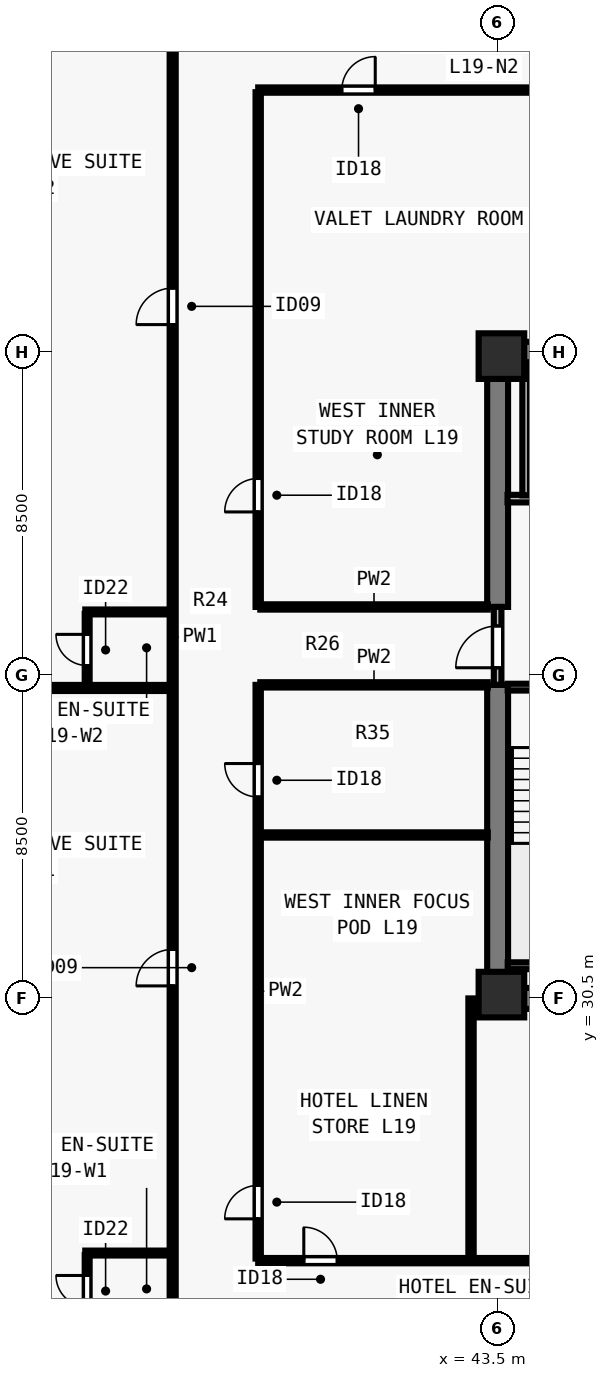
"""IFC4 building model, lengths in metres.
Left out: names, types, materials, properties, quantities, classifications, styles, units other than length and angle.
Written with IfcOpenShell. Run it as: python <this file> out.ifc"""

import sys

from ifc_helpers import new_model, si_unit, direction, frame, frame_2d, origin, origin_2d, place, context, subcontext, project, spatial, rectangle, extrude, element, fill, save


model = new_model("IFC4")
c1 = context("Model", 3, precision=1e-05, world=origin(), true_north=direction((0.0, 1.0)))
c2 = subcontext(c1, "Body", "Model", "MODEL_VIEW")
j1 = project(units=[si_unit("LENGTHUNIT", "METRE"), si_unit("PLANEANGLEUNIT", "RADIAN")], contexts=[c1])
p1 = place(None, origin())
s1 = spatial("IfcSite", under=j1, at=p1, CompositionType="ELEMENT")
p2 = place(p1, origin())
s2 = spatial("IfcBuilding", under=s1, at=p2, CompositionType="ELEMENT")
p3 = place(p2, frame((0.0, 0.0, 72.5)))
s3 = spatial("IfcBuildingStorey", under=s2, at=p3, CompositionType="ELEMENT", Elevation=72.5)
for number, where, z_axis, x_axis in (
    (1, (43.6, 30.6, 0.0), (0.0, 0.0, 1.0), (1.0, 0.0, 0.0)),
    (2, (43.6, 47.4, 0.0), (0.0, 0.0, 1.0), (1.0, 0.0, 0.0)),
):
    element("IfcColumn", number, at=place(p3, frame(where, z_axis=z_axis, x_axis=x_axis)), inside=s3, PredefinedType="COLUMN", context=c2, shape_type="SweptSolid", body=[
        extrude(rectangle(XDim=1.2, YDim=1.2, at=origin_2d()), origin(), (0.0, 0.0, 1.0), 3.5),
    ])
for number, where, z_axis, x_axis in (
    (3, (43.225, 30.5, 0.0), (0.0, 0.0, 1.0), (1.0, 0.0, 0.0)),
    (4, (43.225, 47.5, 0.0), (0.0, 0.0, 1.0), (1.0, 0.0, 0.0)),
):
    element("IfcWall", number, at=place(p3, frame(where, z_axis=z_axis, x_axis=x_axis)), inside=s3, PredefinedType="SHEAR", context=c2, shape_type="SweptSolid", body=[
        extrude(rectangle(XDim=17.55, YDim=0.55, at=frame_2d((8.775, 0.0))), origin(), (0.0, 0.0, 1.0), 3.28),
    ])
p4 = place(p3, frame((43.5, 30.765, 0.0), z_axis=(0.0, 0.0, 1.0), x_axis=(0.0, 1.0, 0.0)))
e5 = element("IfcWall", 5, at=p4, inside=s3, PredefinedType="SHEAR", context=c2, shape_type="SweptSolid", body=[
    extrude(rectangle(XDim=7.985, YDim=0.55, at=frame_2d((3.993, 0.0))), origin(), (0.0, 0.0, 1.0), 3.28),
])
p5 = place(p3, frame((43.5, 40.8, 0.0), z_axis=(0.0, 0.0, 1.0), x_axis=(0.0, 1.0, 0.0)))
e6 = element("IfcWall", 6, at=p5, inside=s3, PredefinedType="SHEAR", context=c2, shape_type="SweptSolid", body=[
    extrude(rectangle(XDim=6.435, YDim=0.55, at=frame_2d((3.218, 0.0))), origin(), (0.0, 0.0, 1.0), 3.28),
])
p6 = place(p3, frame((43.5, 38.75, 0.0), z_axis=(0.0, 0.0, 1.0), x_axis=(0.0, 1.0, 0.0)))
e7 = element("IfcWall", 7, at=p6, inside=s3, PredefinedType="SOLIDWALL", context=c2, shape_type="SweptSolid", body=[
    extrude(rectangle(XDim=2.05, YDim=0.2, at=frame_2d((1.025, 0.0))), origin(), (0.0, 0.0, 1.0), 3.28),
])
p7 = place(p6, frame((0.45, 0.0, 0.0)))
e8 = element("IfcOpeningElement", 8, at=p7, cuts=e7, PredefinedType="OPENING", context=c2, shape_type="SweptSolid", body=[
    extrude(rectangle(XDim=1.1, YDim=2.15, at=frame_2d((0.55, 1.075))), frame((0.0, 0.11, 0.0), z_axis=(0.0, -1.0, 0.0), x_axis=(1.0, 0.0, 0.0)), (0.0, 0.0, 1.0), 0.22),
])
p8 = place(p3, frame((43.76, 43.65, 0.0), z_axis=(0.0, 0.0, 1.0), x_axis=(1.0, 0.0, 0.0)))
e9 = element("IfcWall", 9, at=p8, inside=s3, PredefinedType="SOLIDWALL", context=c2, shape_type="SweptSolid", body=[
    extrude(rectangle(XDim=3.505, YDim=0.2, at=frame_2d((1.752, 0.0))), origin(), (0.0, 0.0, 1.0), 3.28),
])
p9 = place(p8, frame((1.11, 0.0, 0.0)))
e10 = element("IfcOpeningElement", 10, at=p9, cuts=e9, PredefinedType="OPENING", context=c2, shape_type="SweptSolid", body=[
    extrude(rectangle(XDim=1.1, YDim=2.2, at=frame_2d((0.55, 1.1))), frame((0.0, 0.11, 0.0), z_axis=(0.0, -1.0, 0.0), x_axis=(1.0, 0.0, 0.0)), (0.0, 0.0, 1.0), 0.22),
])
p10 = place(p3, frame((44.25, 43.735, 0.0), z_axis=(0.0, 0.0, 1.0), x_axis=(0.0, 1.0, 0.0)))
e11 = element("IfcWall", 11, at=p10, inside=s3, PredefinedType="SOLIDWALL", context=c2, shape_type="SweptSolid", body=[
    extrude(rectangle(XDim=3.505, YDim=0.2, at=frame_2d((1.752, 0.0))), origin(), (0.0, 0.0, 1.0), 3.28),
])
p11 = place(p3, frame((34.95, 21.415, 0.0), z_axis=(0.0, 0.0, 1.0), x_axis=(0.0, 1.0, 0.0)))
e12 = element("IfcWall", 12, at=p11, inside=s3, PredefinedType="PARTITIONING", context=c2, shape_type="SweptSolid", body=[
    extrude(rectangle(XDim=35.17, YDim=0.16, at=frame_2d((17.585, 0.0))), origin(), (0.0, 0.0, 1.0), 3.28),
])
p12 = place(p11, frame((9.414, 0.0, 0.0)))
e13 = element("IfcOpeningElement", 13, at=p12, cuts=e12, PredefinedType="OPENING", context=c2, shape_type="SweptSolid", body=[
    extrude(rectangle(XDim=0.96, YDim=2.15, at=frame_2d((0.48, 1.075))), frame((0.0, 0.09, 0.0), z_axis=(0.0, -1.0, 0.0), x_axis=(1.0, 0.0, 0.0)), (0.0, 0.0, 1.0), 0.18),
])
p13 = place(p11, frame((26.814, 0.0, 0.0)))
e14 = element("IfcOpeningElement", 14, at=p13, cuts=e12, PredefinedType="OPENING", context=c2, shape_type="SweptSolid", body=[
    extrude(rectangle(XDim=0.96, YDim=2.15, at=frame_2d((0.48, 1.075))), frame((0.0, 0.09, 0.0), z_axis=(0.0, -1.0, 0.0), x_axis=(1.0, 0.0, 0.0)), (0.0, 0.0, 1.0), 0.18),
])
p14 = place(p3, frame((37.2, 23.6, 0.0), z_axis=(0.0, 0.0, 1.0), x_axis=(1.0, 0.0, 0.0)))
e15 = element("IfcWall", 15, at=p14, inside=s3, PredefinedType="PARTITIONING", context=c2, shape_type="SweptSolid", body=[
    extrude(rectangle(XDim=29.6, YDim=0.14, at=frame_2d((14.8, 0.0))), origin(), (0.0, 0.0, 1.0), 3.28),
])
p15 = place(p14, frame((1.2, 0.0, 0.0)))
e16 = element("IfcOpeningElement", 16, at=p15, cuts=e15, PredefinedType="OPENING", context=c2, shape_type="SweptSolid", body=[
    extrude(rectangle(XDim=0.88, YDim=2.1, at=frame_2d((0.44, 1.05))), frame((0.0, 0.08, 0.0), z_axis=(0.0, -1.0, 0.0), x_axis=(1.0, 0.0, 0.0)), (0.0, 0.0, 1.0), 0.16),
])
p16 = place(p14, frame((11.3, 0.0, 0.0)))
e17 = element("IfcOpeningElement", 17, at=p16, cuts=e15, PredefinedType="OPENING", context=c2, shape_type="SweptSolid", body=[
    extrude(rectangle(XDim=0.88, YDim=2.1, at=frame_2d((0.44, 1.05))), frame((0.0, 0.08, 0.0), z_axis=(0.0, -1.0, 0.0), x_axis=(1.0, 0.0, 0.0)), (0.0, 0.0, 1.0), 0.16),
])
p17 = place(p14, frame((21.8, 0.0, 0.0)))
e18 = element("IfcOpeningElement", 18, at=p17, cuts=e15, PredefinedType="OPENING", context=c2, shape_type="SweptSolid", body=[
    extrude(rectangle(XDim=0.88, YDim=2.1, at=frame_2d((0.44, 1.05))), frame((0.0, 0.08, 0.0), z_axis=(0.0, -1.0, 0.0), x_axis=(1.0, 0.0, 0.0)), (0.0, 0.0, 1.0), 0.16),
])
p18 = place(p3, frame((37.2, 54.4, 0.0), z_axis=(0.0, 0.0, 1.0), x_axis=(1.0, 0.0, 0.0)))
e19 = element("IfcWall", 19, at=p18, inside=s3, PredefinedType="PARTITIONING", context=c2, shape_type="SweptSolid", body=[
    extrude(rectangle(XDim=29.6, YDim=0.14, at=frame_2d((14.8, 0.0))), origin(), (0.0, 0.0, 1.0), 3.28),
])
p19 = place(p18, frame((2.2, 0.0, 0.0)))
e20 = element("IfcOpeningElement", 20, at=p19, cuts=e19, PredefinedType="OPENING", context=c2, shape_type="SweptSolid", body=[
    extrude(rectangle(XDim=0.88, YDim=2.1, at=frame_2d((0.44, 1.05))), frame((0.0, 0.08, 0.0), z_axis=(0.0, -1.0, 0.0), x_axis=(1.0, 0.0, 0.0)), (0.0, 0.0, 1.0), 0.16),
])
p20 = place(p18, frame((15.3, 0.0, 0.0)))
e21 = element("IfcOpeningElement", 21, at=p20, cuts=e19, PredefinedType="OPENING", context=c2, shape_type="SweptSolid", body=[
    extrude(rectangle(XDim=0.88, YDim=2.1, at=frame_2d((0.44, 1.05))), frame((0.0, 0.08, 0.0), z_axis=(0.0, -1.0, 0.0), x_axis=(1.0, 0.0, 0.0)), (0.0, 0.0, 1.0), 0.16),
])
p21 = place(p18, frame((24.8, 0.0, 0.0)))
e22 = element("IfcOpeningElement", 22, at=p21, cuts=e19, PredefinedType="OPENING", context=c2, shape_type="SweptSolid", body=[
    extrude(rectangle(XDim=0.88, YDim=2.1, at=frame_2d((0.44, 1.05))), frame((0.0, 0.08, 0.0), z_axis=(0.0, -1.0, 0.0), x_axis=(1.0, 0.0, 0.0)), (0.0, 0.0, 1.0), 0.16),
])
p22 = place(p3, frame((37.2, 23.655, 0.0), z_axis=(0.0, 0.0, 1.0), x_axis=(0.0, 1.0, 0.0)))
e23 = element("IfcWall", 23, at=p22, inside=s3, PredefinedType="PARTITIONING", context=c2, shape_type="SweptSolid", body=[
    extrude(rectangle(XDim=15.095, YDim=0.14, at=frame_2d((7.547, 0.0))), origin(), (0.0, 0.0, 1.0), 3.28),
])
p23 = place(p22, frame((1.045, 0.0, 0.0)))
e24 = element("IfcOpeningElement", 24, at=p23, cuts=e23, PredefinedType="OPENING", context=c2, shape_type="SweptSolid", body=[
    extrude(rectangle(XDim=0.88, YDim=2.1, at=frame_2d((0.44, 1.05))), frame((0.0, 0.08, 0.0), z_axis=(0.0, -1.0, 0.0), x_axis=(1.0, 0.0, 0.0)), (0.0, 0.0, 1.0), 0.16),
])
p24 = place(p22, frame((12.145, 0.0, 0.0)))
e25 = element("IfcOpeningElement", 25, at=p24, cuts=e23, PredefinedType="OPENING", context=c2, shape_type="SweptSolid", body=[
    extrude(rectangle(XDim=0.88, YDim=2.1, at=frame_2d((0.44, 1.05))), frame((0.0, 0.08, 0.0), z_axis=(0.0, -1.0, 0.0), x_axis=(1.0, 0.0, 0.0)), (0.0, 0.0, 1.0), 0.16),
])
p25 = place(p3, frame((37.2, 40.8, 0.0), z_axis=(0.0, 0.0, 1.0), x_axis=(0.0, 1.0, 0.0)))
e26 = element("IfcWall", 26, at=p25, inside=s3, PredefinedType="PARTITIONING", context=c2, shape_type="SweptSolid", body=[
    extrude(rectangle(XDim=13.545, YDim=0.14, at=frame_2d((6.772, 0.0))), origin(), (0.0, 0.0, 1.0), 3.28),
])
p26 = place(p25, frame((2.5, 0.0, 0.0)))
e27 = element("IfcOpeningElement", 27, at=p26, cuts=e26, PredefinedType="OPENING", context=c2, shape_type="SweptSolid", body=[
    extrude(rectangle(XDim=0.88, YDim=2.1, at=frame_2d((0.44, 1.05))), frame((0.0, 0.08, 0.0), z_axis=(0.0, -1.0, 0.0), x_axis=(1.0, 0.0, 0.0)), (0.0, 0.0, 1.0), 0.16),
])
for number, where, z_axis, x_axis in (
    (28, (37.255, 38.75, 0.0), (0.0, 0.0, 1.0), (1.0, 0.0, 0.0)),
    (29, (37.255, 40.8, 0.0), (0.0, 0.0, 1.0), (1.0, 0.0, 0.0)),
):
    element("IfcWall", number, at=place(p3, frame(where, z_axis=z_axis, x_axis=x_axis)), inside=s3, PredefinedType="PARTITIONING", context=c2, shape_type="SweptSolid", body=[
        extrude(rectangle(XDim=5.985, YDim=0.14, at=frame_2d((2.993, 0.0))), origin(), (0.0, 0.0, 1.0), 3.28),
    ])
p27 = place(p3, frame((42.8, 23.655, 0.0), z_axis=(0.0, 0.0, 1.0), x_axis=(0.0, 1.0, 0.0)))
e30 = element("IfcWall", 30, at=p27, inside=s3, PredefinedType="PARTITIONING", context=c2, shape_type="SweptSolid", body=[
    extrude(rectangle(XDim=6.845, YDim=0.14, at=frame_2d((3.422, 0.0))), origin(), (0.0, 0.0, 1.0), 2.439),
])
p28 = place(p3, frame((37.255, 34.8, 0.0), z_axis=(0.0, 0.0, 1.0), x_axis=(1.0, 0.0, 0.0)))
e31 = element("IfcWall", 31, at=p28, inside=s3, PredefinedType="PARTITIONING", context=c2, shape_type="SweptSolid", body=[
    extrude(rectangle(XDim=5.985, YDim=0.14, at=frame_2d((2.993, 0.0))), origin(), (0.0, 0.0, 1.0), 3.28),
])
p29 = place(p3, frame((32.65, 23.8, 0.0), z_axis=(0.0, 0.0, 1.0), x_axis=(1.0, 0.0, 0.0)))
e32 = element("IfcWall", 32, at=p29, inside=s3, PredefinedType="PLUMBINGWALL", context=c2, shape_type="SweptSolid", body=[
    extrude(rectangle(XDim=2.235, YDim=0.13, at=frame_2d((1.118, 0.0))), origin(), (0.0, 0.0, 1.0), 3.28),
])
p30 = place(p3, frame((32.7, 21.85, 0.0), z_axis=(0.0, 0.0, 1.0), x_axis=(0.0, 1.0, 0.0)))
e33 = element("IfcWall", 33, at=p30, inside=s3, PredefinedType="PLUMBINGWALL", context=c2, shape_type="SweptSolid", body=[
    extrude(rectangle(XDim=1.9, YDim=0.13, at=frame_2d((0.95, 0.0))), origin(), (0.0, 0.0, 1.0), 3.28),
])
p31 = place(p30, frame((0.54, 0.0, 0.0)))
e34 = element("IfcOpeningElement", 34, at=p31, cuts=e33, PredefinedType="OPENING", context=c2, shape_type="SweptSolid", body=[
    extrude(rectangle(XDim=0.82, YDim=2.1, at=frame_2d((0.41, 1.05))), frame((0.0, 0.075, 0.0), z_axis=(0.0, -1.0, 0.0), x_axis=(1.0, 0.0, 0.0)), (0.0, 0.0, 1.0), 0.15),
])
p32 = place(p3, frame((26.845, 38.668, 0.0), z_axis=(0.0, 0.0, 1.0), x_axis=(1.0, 0.0, 0.0)))
e35 = element("IfcWall", 35, at=p32, inside=s3, PredefinedType="PARTITIONING", context=c2, shape_type="SweptSolid", body=[
    extrude(rectangle(XDim=8.04, YDim=0.16, at=frame_2d((4.02, 0.0))), origin(), (0.0, 0.0, 1.0), 2.849),
])
p33 = place(p3, frame((32.65, 40.668, 0.0), z_axis=(0.0, 0.0, 1.0), x_axis=(1.0, 0.0, 0.0)))
e36 = element("IfcWall", 36, at=p33, inside=s3, PredefinedType="PLUMBINGWALL", context=c2, shape_type="SweptSolid", body=[
    extrude(rectangle(XDim=2.235, YDim=0.13, at=frame_2d((1.118, 0.0))), origin(), (0.0, 0.0, 1.0), 3.28),
])
p34 = place(p3, frame((32.7, 38.733, 0.0), z_axis=(0.0, 0.0, 1.0), x_axis=(0.0, 1.0, 0.0)))
e37 = element("IfcWall", 37, at=p34, inside=s3, PredefinedType="PLUMBINGWALL", context=c2, shape_type="SweptSolid", body=[
    extrude(rectangle(XDim=1.885, YDim=0.13, at=frame_2d((0.942, 0.0))), origin(), (0.0, 0.0, 1.0), 3.28),
])
p35 = place(p34, frame((0.525, 0.0, 0.0)))
e38 = element("IfcOpeningElement", 38, at=p35, cuts=e37, PredefinedType="OPENING", context=c2, shape_type="SweptSolid", body=[
    extrude(rectangle(XDim=0.82, YDim=2.1, at=frame_2d((0.41, 1.05))), frame((0.0, 0.075, 0.0), z_axis=(0.0, -1.0, 0.0), x_axis=(1.0, 0.0, 0.0)), (0.0, 0.0, 1.0), 0.15),
])
p36 = place(p3, frame((43.765, 38.69, 0.0), z_axis=(0.0, 0.0, 1.0), x_axis=(1.0, 0.0, 0.0)))
e39 = element("IfcWall", 39, at=p36, inside=s3, PredefinedType="SOLIDWALL", context=c2, shape_type="SweptSolid", body=[
    extrude(rectangle(XDim=3.23, YDim=0.18, at=frame_2d((1.615, 0.0))), origin(), (0.0, 0.0, 1.0), 3.28),
])
p37 = place(p36, frame((1.14, 0.0, 0.0)))
e40 = element("IfcOpeningElement", 40, at=p37, cuts=e39, PredefinedType="OPENING", context=c2, shape_type="SweptSolid", body=[
    extrude(rectangle(XDim=0.95, YDim=2.15, at=frame_2d((0.475, 1.075))), frame((0.0, 0.1, 0.0), z_axis=(0.0, -1.0, 0.0), x_axis=(1.0, 0.0, 0.0)), (0.0, 0.0, 1.0), 0.2),
])
p38 = place(p3, frame((43.765, 31.36, 0.0), z_axis=(0.0, 0.0, 1.0), x_axis=(1.0, 0.0, 0.0)))
e41 = element("IfcWall", 41, at=p38, inside=s3, PredefinedType="SOLIDWALL", context=c2, shape_type="SweptSolid", body=[
    extrude(rectangle(XDim=3.23, YDim=0.18, at=frame_2d((1.615, 0.0))), origin(), (0.0, 0.0, 1.0), 3.28),
])
p39 = place(p7, origin())
e42 = element("IfcDoor", 42, at=p39, inside=s3, OperationType="SINGLE_SWING_LEFT", PredefinedType="DOOR", context=c2, shape_type="SweptSolid", body=[
    extrude(rectangle(XDim=1.1, YDim=2.15, at=frame_2d((0.55, 1.075))), frame((0.0, 0.025, 0.0), z_axis=(0.0, -1.0, 0.0), x_axis=(1.0, 0.0, 0.0)), (0.0, 0.0, 1.0), 0.05),
])
fill(e8, e42)
p40 = place(p15, origin())
e43 = element("IfcDoor", 43, at=p40, inside=s3, OperationType="SINGLE_SWING_LEFT", PredefinedType="DOOR", context=c2, shape_type="SweptSolid", body=[
    extrude(rectangle(XDim=0.88, YDim=2.1, at=frame_2d((0.44, 1.05))), frame((0.0, 0.025, 0.0), z_axis=(0.0, -1.0, 0.0), x_axis=(1.0, 0.0, 0.0)), (0.0, 0.0, 1.0), 0.05),
])
fill(e16, e43)
p41 = place(p19, origin())
e44 = element("IfcDoor", 44, at=p41, inside=s3, OperationType="SINGLE_SWING_RIGHT", PredefinedType="DOOR", context=c2, shape_type="SweptSolid", body=[
    extrude(rectangle(XDim=0.88, YDim=2.1, at=frame_2d((0.44, 1.05))), frame((0.0, 0.025, 0.0), z_axis=(0.0, -1.0, 0.0), x_axis=(1.0, 0.0, 0.0)), (0.0, 0.0, 1.0), 0.05),
])
fill(e20, e44)
p42 = place(p23, origin())
e45 = element("IfcDoor", 45, at=p42, inside=s3, OperationType="SINGLE_SWING_LEFT", PredefinedType="DOOR", context=c2, shape_type="SweptSolid", body=[
    extrude(rectangle(XDim=0.88, YDim=2.1, at=frame_2d((0.44, 1.05))), frame((0.0, 0.025, 0.0), z_axis=(0.0, -1.0, 0.0), x_axis=(1.0, 0.0, 0.0)), (0.0, 0.0, 1.0), 0.05),
])
fill(e24, e45)
p43 = place(p24, origin())
e46 = element("IfcDoor", 46, at=p43, inside=s3, OperationType="SINGLE_SWING_RIGHT", PredefinedType="DOOR", context=c2, shape_type="SweptSolid", body=[
    extrude(rectangle(XDim=0.88, YDim=2.1, at=frame_2d((0.44, 1.05))), frame((0.0, 0.025, 0.0), z_axis=(0.0, -1.0, 0.0), x_axis=(1.0, 0.0, 0.0)), (0.0, 0.0, 1.0), 0.05),
])
fill(e25, e46)
p44 = place(p26, origin())
e47 = element("IfcDoor", 47, at=p44, inside=s3, OperationType="SINGLE_SWING_LEFT", PredefinedType="DOOR", context=c2, shape_type="SweptSolid", body=[
    extrude(rectangle(XDim=0.88, YDim=2.1, at=frame_2d((0.44, 1.05))), frame((0.0, 0.025, 0.0), z_axis=(0.0, -1.0, 0.0), x_axis=(1.0, 0.0, 0.0)), (0.0, 0.0, 1.0), 0.05),
])
fill(e27, e47)
p45 = place(p31, origin())
e48 = element("IfcDoor", 48, at=p45, inside=s3, OperationType="SINGLE_SWING_RIGHT", PredefinedType="DOOR", context=c2, shape_type="SweptSolid", body=[
    extrude(rectangle(XDim=0.82, YDim=2.1, at=frame_2d((0.41, 1.05))), frame((0.0, 0.025, 0.0), z_axis=(0.0, -1.0, 0.0), x_axis=(1.0, 0.0, 0.0)), (0.0, 0.0, 1.0), 0.05),
])
fill(e34, e48)
p46 = place(p12, origin())
e49 = element("IfcDoor", 49, at=p46, inside=s3, OperationType="SINGLE_SWING_LEFT", PredefinedType="DOOR", context=c2, shape_type="SweptSolid", body=[
    extrude(rectangle(XDim=0.96, YDim=2.15, at=frame_2d((0.48, 1.075))), frame((0.0, 0.025, 0.0), z_axis=(0.0, -1.0, 0.0), x_axis=(1.0, 0.0, 0.0)), (0.0, 0.0, 1.0), 0.05),
])
fill(e13, e49)
p47 = place(p35, origin())
e50 = element("IfcDoor", 50, at=p47, inside=s3, OperationType="SINGLE_SWING_RIGHT", PredefinedType="DOOR", context=c2, shape_type="SweptSolid", body=[
    extrude(rectangle(XDim=0.82, YDim=2.1, at=frame_2d((0.41, 1.05))), frame((0.0, 0.025, 0.0), z_axis=(0.0, -1.0, 0.0), x_axis=(1.0, 0.0, 0.0)), (0.0, 0.0, 1.0), 0.05),
])
fill(e38, e50)
p48 = place(p13, origin())
e51 = element("IfcDoor", 51, at=p48, inside=s3, OperationType="SINGLE_SWING_LEFT", PredefinedType="DOOR", context=c2, shape_type="SweptSolid", body=[
    extrude(rectangle(XDim=0.96, YDim=2.15, at=frame_2d((0.48, 1.075))), frame((0.0, 0.025, 0.0), z_axis=(0.0, -1.0, 0.0), x_axis=(1.0, 0.0, 0.0)), (0.0, 0.0, 1.0), 0.05),
])
fill(e14, e51)
save(model, sys.argv[1])
